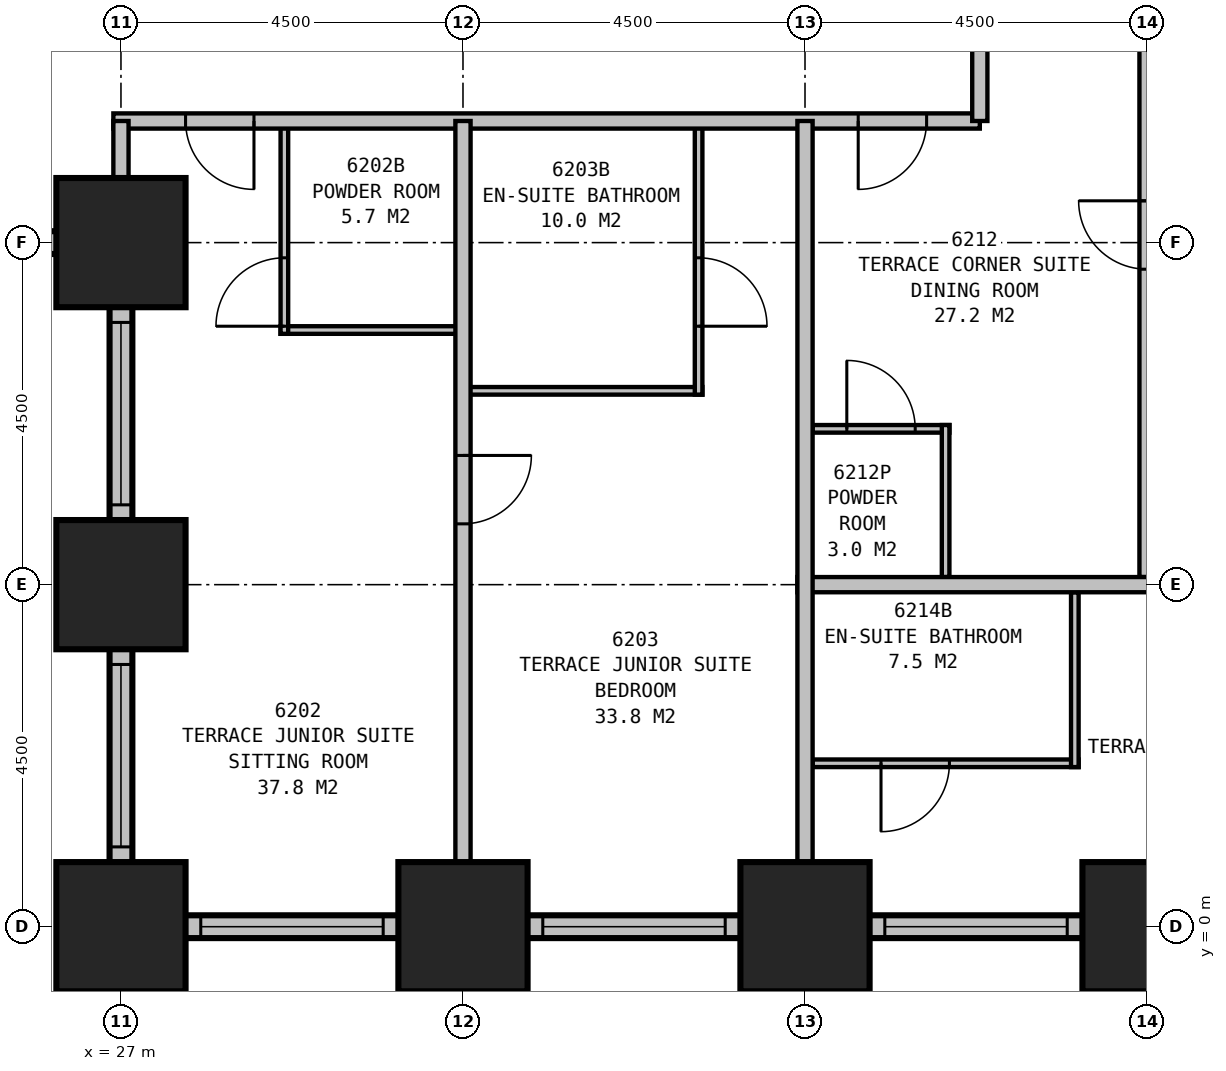
"""IFC4 building model, lengths in metres.
Left out: names, types, materials, properties, quantities, classifications, styles, units other than length and angle.
Written with IfcOpenShell. Run it as: python <this file> out.ifc"""

import sys

from ifc_helpers import new_model, si_unit, direction, frame, frame_2d, origin, origin_2d, place, context, subcontext, project, spatial, rectangle, extrude, element, fill, save


model = new_model("IFC4")
c1 = context("Model", 3, precision=1e-05, world=origin(), true_north=direction((0.0, 1.0)))
c2 = subcontext(c1, "Body", "Model", "MODEL_VIEW")
j1 = project(units=[si_unit("LENGTHUNIT", "METRE"), si_unit("PLANEANGLEUNIT", "RADIAN")], contexts=[c1])
p1 = place(None, origin())
s1 = spatial("IfcSite", under=j1, at=p1, CompositionType="ELEMENT")
p2 = place(p1, origin())
s2 = spatial("IfcBuilding", under=s1, at=p2, CompositionType="ELEMENT")
p3 = place(p2, frame((0.0, 0.0, 240.8)))
s3 = spatial("IfcBuildingStorey", under=s2, at=p3, CompositionType="ELEMENT", Elevation=240.8)
for number, where, z_axis, x_axis in (
    (1, (27.0, 9.0, 0.0), (0.0, 0.0, 1.0), (1.0, 0.0, 0.0)),
    (2, (27.0, 4.5, 0.0), (0.0, 0.0, 1.0), (1.0, 0.0, 0.0)),
    (3, (27.0, 0.0, 0.0), (0.0, 0.0, 1.0), (1.0, 0.0, 0.0)),
    (4, (31.5, 0.0, 0.0), (0.0, 0.0, 1.0), (1.0, 0.0, 0.0)),
    (5, (36.0, 0.0, 0.0), (0.0, 0.0, 1.0), (1.0, 0.0, 0.0)),
    (6, (40.5, 0.0, 0.0), (0.0, 0.0, 1.0), (1.0, 0.0, 0.0)),
):
    element("IfcColumn", number, at=place(p3, frame(where, z_axis=z_axis, x_axis=x_axis)), inside=s3, PredefinedType="COLUMN", context=c2, shape_type="SweptSolid", body=[
        extrude(rectangle(XDim=1.7, YDim=1.7, at=origin_2d()), origin(), (0.0, 0.0, 1.0), 3.9),
    ])
p4 = place(p3, frame((9.85, 9.0, 0.0), z_axis=(0.0, 0.0, 1.0), x_axis=(1.0, 0.0, 0.0)))
e7 = element("IfcWall", 7, at=p4, inside=s3, PredefinedType="STANDARD", context=c2, shape_type="SweptSolid", body=[
    extrude(rectangle(XDim=17.3, YDim=0.3, at=frame_2d((8.65, 0.0))), origin(), (0.0, 0.0, 1.0), 2.45),
])
p5 = place(p4, frame((1.15, 0.0, 0.5)))
e8 = element("IfcOpeningElement", 8, at=p5, cuts=e7, PredefinedType="OPENING", context=c2, shape_type="SweptSolid", body=[
    extrude(rectangle(XDim=1.5, YDim=1.75, at=frame_2d((0.75, 0.875))), frame((0.0, 0.16, 0.0), z_axis=(0.0, -1.0, 0.0), x_axis=(1.0, 0.0, 0.0)), (0.0, 0.0, 1.0), 0.32),
])
p6 = place(p4, frame((4.7, 0.0, 0.5)))
e9 = element("IfcOpeningElement", 9, at=p6, cuts=e7, PredefinedType="OPENING", context=c2, shape_type="SweptSolid", body=[
    extrude(rectangle(XDim=2.4, YDim=1.75, at=frame_2d((1.2, 0.875))), frame((0.0, 0.16, 0.0), z_axis=(0.0, -1.0, 0.0), x_axis=(1.0, 0.0, 0.0)), (0.0, 0.0, 1.0), 0.32),
])
p7 = place(p4, frame((9.2, 0.0, 0.5)))
e10 = element("IfcOpeningElement", 10, at=p7, cuts=e7, PredefinedType="OPENING", context=c2, shape_type="SweptSolid", body=[
    extrude(rectangle(XDim=2.4, YDim=1.75, at=frame_2d((1.2, 0.875))), frame((0.0, 0.16, 0.0), z_axis=(0.0, -1.0, 0.0), x_axis=(1.0, 0.0, 0.0)), (0.0, 0.0, 1.0), 0.32),
])
p8 = place(p4, frame((13.7, 0.0, 0.5)))
e11 = element("IfcOpeningElement", 11, at=p8, cuts=e7, PredefinedType="OPENING", context=c2, shape_type="SweptSolid", body=[
    extrude(rectangle(XDim=2.4, YDim=1.75, at=frame_2d((1.2, 0.875))), frame((0.0, 0.16, 0.0), z_axis=(0.0, -1.0, 0.0), x_axis=(1.0, 0.0, 0.0)), (0.0, 0.0, 1.0), 0.32),
])
p9 = place(p3, frame((27.0, 9.15, 0.0), z_axis=(0.0, 0.0, 1.0), x_axis=(0.0, -1.0, 0.0)))
e12 = element("IfcWall", 12, at=p9, inside=s3, PredefinedType="STANDARD", context=c2, shape_type="SweptSolid", body=[
    extrude(rectangle(XDim=9.3, YDim=0.3, at=frame_2d((4.65, 0.0))), origin(), (0.0, 0.0, 1.0), 2.45),
])
p10 = place(p9, frame((1.2, 0.0, 0.5)))
e13 = element("IfcOpeningElement", 13, at=p10, cuts=e12, PredefinedType="OPENING", context=c2, shape_type="SweptSolid", body=[
    extrude(rectangle(XDim=2.4, YDim=1.75, at=frame_2d((1.2, 0.875))), frame((0.0, 0.16, 0.0), z_axis=(0.0, -1.0, 0.0), x_axis=(1.0, 0.0, 0.0)), (0.0, 0.0, 1.0), 0.32),
])
p11 = place(p9, frame((5.7, 0.0, 0.5)))
e14 = element("IfcOpeningElement", 14, at=p11, cuts=e12, PredefinedType="OPENING", context=c2, shape_type="SweptSolid", body=[
    extrude(rectangle(XDim=2.4, YDim=1.75, at=frame_2d((1.2, 0.875))), frame((0.0, 0.16, 0.0), z_axis=(0.0, -1.0, 0.0), x_axis=(1.0, 0.0, 0.0)), (0.0, 0.0, 1.0), 0.32),
])
p12 = place(p3, frame((26.85, 0.0, 0.0), z_axis=(0.0, 0.0, 1.0), x_axis=(1.0, 0.0, 0.0)))
e15 = element("IfcWall", 15, at=p12, inside=s3, PredefinedType="STANDARD", context=c2, shape_type="SweptSolid", body=[
    extrude(rectangle(XDim=18.3, YDim=0.3, at=frame_2d((9.15, 0.0))), origin(), (0.0, 0.0, 1.0), 2.45),
])
p13 = place(p12, frame((1.2, 0.0, 0.5)))
e16 = element("IfcOpeningElement", 16, at=p13, cuts=e15, PredefinedType="OPENING", context=c2, shape_type="SweptSolid", body=[
    extrude(rectangle(XDim=2.4, YDim=1.75, at=frame_2d((1.2, 0.875))), frame((0.0, 0.16, 0.0), z_axis=(0.0, -1.0, 0.0), x_axis=(1.0, 0.0, 0.0)), (0.0, 0.0, 1.0), 0.32),
])
p14 = place(p12, frame((5.7, 0.0, 0.5)))
e17 = element("IfcOpeningElement", 17, at=p14, cuts=e15, PredefinedType="OPENING", context=c2, shape_type="SweptSolid", body=[
    extrude(rectangle(XDim=2.4, YDim=1.75, at=frame_2d((1.2, 0.875))), frame((0.0, 0.16, 0.0), z_axis=(0.0, -1.0, 0.0), x_axis=(1.0, 0.0, 0.0)), (0.0, 0.0, 1.0), 0.32),
])
p15 = place(p12, frame((10.2, 0.0, 0.5)))
e18 = element("IfcOpeningElement", 18, at=p15, cuts=e15, PredefinedType="OPENING", context=c2, shape_type="SweptSolid", body=[
    extrude(rectangle(XDim=2.4, YDim=1.75, at=frame_2d((1.2, 0.875))), frame((0.0, 0.16, 0.0), z_axis=(0.0, -1.0, 0.0), x_axis=(1.0, 0.0, 0.0)), (0.0, 0.0, 1.0), 0.32),
])
p16 = place(p12, frame((14.7, 0.0, 0.5)))
e19 = element("IfcOpeningElement", 19, at=p16, cuts=e15, PredefinedType="OPENING", context=c2, shape_type="SweptSolid", body=[
    extrude(rectangle(XDim=2.4, YDim=1.75, at=frame_2d((1.2, 0.875))), frame((0.0, 0.16, 0.0), z_axis=(0.0, -1.0, 0.0), x_axis=(1.0, 0.0, 0.0)), (0.0, 0.0, 1.0), 0.32),
])
p17 = place(p3, frame((26.9, 10.6, 0.0), z_axis=(0.0, 0.0, 1.0), x_axis=(1.0, 0.0, 0.0)))
e20 = element("IfcWall", 20, at=p17, inside=s3, PredefinedType="PARTITIONING", context=c2, shape_type="SweptSolid", body=[
    extrude(rectangle(XDim=11.4, YDim=0.2, at=frame_2d((5.7, 0.0))), origin(), (0.0, 0.0, 1.0), 3.65),
])
p18 = place(p17, frame((1.85, 0.0, 0.0), z_axis=(0.0, 0.0, 1.0), x_axis=(-1.0, 0.0, 0.0)))
e21 = element("IfcOpeningElement", 21, at=p18, cuts=e20, PredefinedType="OPENING", context=c2, shape_type="SweptSolid", body=[
    extrude(rectangle(XDim=0.9, YDim=2.1, at=frame_2d((0.45, 1.05))), frame((0.0, 0.11, 0.0), z_axis=(0.0, -1.0, 0.0), x_axis=(1.0, 0.0, 0.0)), (0.0, 0.0, 1.0), 0.22),
])
p19 = place(p17, frame((10.7, 0.0, 0.0), z_axis=(0.0, 0.0, 1.0), x_axis=(-1.0, 0.0, 0.0)))
e22 = element("IfcOpeningElement", 22, at=p19, cuts=e20, PredefinedType="OPENING", context=c2, shape_type="SweptSolid", body=[
    extrude(rectangle(XDim=0.9, YDim=2.1, at=frame_2d((0.45, 1.05))), frame((0.0, 0.11, 0.0), z_axis=(0.0, -1.0, 0.0), x_axis=(1.0, 0.0, 0.0)), (0.0, 0.0, 1.0), 0.22),
])
p20 = place(p3, frame((38.3, 10.6, 0.0), z_axis=(0.0, 0.0, 1.0), x_axis=(0.0, 1.0, 0.0)))
e23 = element("IfcWall", 23, at=p20, inside=s3, PredefinedType="PARTITIONING", context=c2, shape_type="SweptSolid", body=[
    extrude(rectangle(XDim=18.7, YDim=0.2, at=frame_2d((9.35, 0.0))), origin(), (0.0, 0.0, 1.0), 3.65),
])
p21 = place(p20, frame((6.55, 0.0, 0.0), z_axis=(0.0, 0.0, 1.0), x_axis=(-1.0, 0.0, 0.0)))
e24 = element("IfcOpeningElement", 24, at=p21, cuts=e23, PredefinedType="OPENING", context=c2, shape_type="SweptSolid", body=[
    extrude(rectangle(XDim=0.9, YDim=2.1, at=frame_2d((0.45, 1.05))), frame((0.0, 0.11, 0.0), z_axis=(0.0, -1.0, 0.0), x_axis=(1.0, 0.0, 0.0)), (0.0, 0.0, 1.0), 0.22),
])
p22 = place(p20, frame((16.1, 0.0, 0.0), z_axis=(0.0, 0.0, 1.0), x_axis=(-1.0, 0.0, 0.0)))
e25 = element("IfcOpeningElement", 25, at=p22, cuts=e23, PredefinedType="OPENING", context=c2, shape_type="SweptSolid", body=[
    extrude(rectangle(XDim=1.0, YDim=2.1, at=frame_2d((0.5, 1.05))), frame((0.0, 0.11, 0.0), z_axis=(0.0, -1.0, 0.0), x_axis=(1.0, 0.0, 0.0)), (0.0, 0.0, 1.0), 0.22),
])
p23 = place(p3, frame((27.0, 10.6, 0.0), z_axis=(0.0, 0.0, 1.0), x_axis=(0.0, -1.0, 0.0)))
e26 = element("IfcWall", 26, at=p23, inside=s3, PredefinedType="PARTITIONING", context=c2, shape_type="SweptSolid", body=[
    extrude(rectangle(XDim=1.6, YDim=0.2, at=frame_2d((0.8, 0.0))), origin(), (0.0, 0.0, 1.0), 2.6),
])
p24 = place(p3, frame((31.5, 10.6, 0.0), z_axis=(0.0, 0.0, 1.0), x_axis=(0.0, -1.0, 0.0)))
e27 = element("IfcWall", 27, at=p24, inside=s3, PredefinedType="PARTITIONING", context=c2, shape_type="SweptSolid", body=[
    extrude(rectangle(XDim=10.6, YDim=0.2, at=frame_2d((5.3, 0.0))), origin(), (0.0, 0.0, 1.0), 2.6),
])
p25 = place(p24, frame((4.4, 0.0, 0.0)))
e28 = element("IfcOpeningElement", 28, at=p25, cuts=e27, PredefinedType="OPENING", context=c2, shape_type="SweptSolid", body=[
    extrude(rectangle(XDim=0.9, YDim=2.1, at=frame_2d((0.45, 1.05))), frame((0.0, 0.11, 0.0), z_axis=(0.0, -1.0, 0.0), x_axis=(1.0, 0.0, 0.0)), (0.0, 0.0, 1.0), 0.22),
])
p26 = place(p3, frame((29.1, 7.85, 0.0), z_axis=(0.0, 0.0, 1.0), x_axis=(1.0, 0.0, 0.0)))
e29 = element("IfcWall", 29, at=p26, inside=s3, PredefinedType="PLUMBINGWALL", context=c2, shape_type="SweptSolid", body=[
    extrude(rectangle(XDim=2.4, YDim=0.1, at=frame_2d((1.2, 0.0))), origin(), (0.0, 0.0, 1.0), 3.65),
])
p27 = place(p3, frame((29.15, 10.6, 0.0), z_axis=(0.0, 0.0, 1.0), x_axis=(0.0, -1.0, 0.0)))
e30 = element("IfcWall", 30, at=p27, inside=s3, PredefinedType="PLUMBINGWALL", context=c2, shape_type="SweptSolid", body=[
    extrude(rectangle(XDim=2.8, YDim=0.1, at=frame_2d((1.4, 0.0))), origin(), (0.0, 0.0, 1.0), 3.65),
])
p28 = place(p27, frame((2.7, 0.0, 0.0), z_axis=(0.0, 0.0, 1.0), x_axis=(-1.0, 0.0, 0.0)))
e31 = element("IfcOpeningElement", 31, at=p28, cuts=e30, PredefinedType="OPENING", context=c2, shape_type="SweptSolid", body=[
    extrude(rectangle(XDim=0.9, YDim=2.1, at=frame_2d((0.45, 1.05))), frame((0.0, 0.06, 0.0), z_axis=(0.0, -1.0, 0.0), x_axis=(1.0, 0.0, 0.0)), (0.0, 0.0, 1.0), 0.12),
])
p29 = place(p3, frame((31.5, 7.05, 0.0), z_axis=(0.0, 0.0, 1.0), x_axis=(1.0, 0.0, 0.0)))
e32 = element("IfcWall", 32, at=p29, inside=s3, PredefinedType="PLUMBINGWALL", context=c2, shape_type="SweptSolid", body=[
    extrude(rectangle(XDim=3.15, YDim=0.1, at=frame_2d((1.575, 0.0))), origin(), (0.0, 0.0, 1.0), 3.65),
])
p30 = place(p3, frame((34.6, 10.6, 0.0), z_axis=(0.0, 0.0, 1.0), x_axis=(0.0, -1.0, 0.0)))
e33 = element("IfcWall", 33, at=p30, inside=s3, PredefinedType="PLUMBINGWALL", context=c2, shape_type="SweptSolid", body=[
    extrude(rectangle(XDim=3.6, YDim=0.1, at=frame_2d((1.8, 0.0))), origin(), (0.0, 0.0, 1.0), 3.65),
])
p31 = place(p30, frame((1.8, 0.0, 0.0)))
e34 = element("IfcOpeningElement", 34, at=p31, cuts=e33, PredefinedType="OPENING", context=c2, shape_type="SweptSolid", body=[
    extrude(rectangle(XDim=0.9, YDim=2.1, at=frame_2d((0.45, 1.05))), frame((0.0, 0.06, 0.0), z_axis=(0.0, -1.0, 0.0), x_axis=(1.0, 0.0, 0.0)), (0.0, 0.0, 1.0), 0.12),
])
p32 = place(p3, frame((36.0, 10.6, 0.0), z_axis=(0.0, 0.0, 1.0), x_axis=(0.0, -1.0, 0.0)))
e35 = element("IfcWall", 35, at=p32, inside=s3, PredefinedType="PARTITIONING", context=c2, shape_type="SweptSolid", body=[
    extrude(rectangle(XDim=10.6, YDim=0.2, at=frame_2d((5.3, 0.0))), origin(), (0.0, 0.0, 1.0), 2.6),
])
p33 = place(p3, frame((35.9, 4.5, 0.0), z_axis=(0.0, 0.0, 1.0), x_axis=(1.0, 0.0, 0.0)))
e36 = element("IfcWall", 36, at=p33, inside=s3, PredefinedType="PARTITIONING", context=c2, shape_type="SweptSolid", body=[
    extrude(rectangle(XDim=9.1, YDim=0.2, at=frame_2d((4.55, 0.0))), origin(), (0.0, 0.0, 1.0), 3.65),
])
p34 = place(p33, frame((7.1, 0.0, 0.0)))
e37 = element("IfcOpeningElement", 37, at=p34, cuts=e36, PredefinedType="OPENING", context=c2, shape_type="SweptSolid", body=[
    extrude(rectangle(XDim=0.9, YDim=2.1, at=frame_2d((0.45, 1.05))), frame((0.0, 0.11, 0.0), z_axis=(0.0, -1.0, 0.0), x_axis=(1.0, 0.0, 0.0)), (0.0, 0.0, 1.0), 0.22),
])
p35 = place(p3, frame((40.5, 4.6, 0.0), z_axis=(0.0, 0.0, 1.0), x_axis=(0.0, 1.0, 0.0)))
e38 = element("IfcWall", 38, at=p35, inside=s3, PredefinedType="PARTITIONING", context=c2, shape_type="SweptSolid", body=[
    extrude(rectangle(XDim=8.8, YDim=0.2, at=frame_2d((4.4, 0.0))), origin(), (0.0, 0.0, 1.0), 2.6),
])
p36 = place(p35, frame((4.05, 0.0, 0.0)))
e39 = element("IfcOpeningElement", 39, at=p36, cuts=e38, PredefinedType="OPENING", context=c2, shape_type="SweptSolid", body=[
    extrude(rectangle(XDim=0.9, YDim=2.1, at=frame_2d((0.45, 1.05))), frame((0.0, 0.11, 0.0), z_axis=(0.0, -1.0, 0.0), x_axis=(1.0, 0.0, 0.0)), (0.0, 0.0, 1.0), 0.22),
])
p37 = place(p3, frame((37.85, 4.6, 0.0), z_axis=(0.0, 0.0, 1.0), x_axis=(0.0, 1.0, 0.0)))
e40 = element("IfcWall", 40, at=p37, inside=s3, PredefinedType="PLUMBINGWALL", context=c2, shape_type="SweptSolid", body=[
    extrude(rectangle(XDim=2.0, YDim=0.1, at=frame_2d((1.0, 0.0))), origin(), (0.0, 0.0, 1.0), 3.65),
])
p38 = place(p3, frame((36.1, 6.55, 0.0), z_axis=(0.0, 0.0, 1.0), x_axis=(1.0, 0.0, 0.0)))
e41 = element("IfcWall", 41, at=p38, inside=s3, PredefinedType="PLUMBINGWALL", context=c2, shape_type="SweptSolid", body=[
    extrude(rectangle(XDim=1.8, YDim=0.1, at=frame_2d((0.9, 0.0))), origin(), (0.0, 0.0, 1.0), 3.65),
])
p39 = place(p38, frame((0.45, 0.0, 0.0)))
e42 = element("IfcOpeningElement", 42, at=p39, cuts=e41, PredefinedType="OPENING", context=c2, shape_type="SweptSolid", body=[
    extrude(rectangle(XDim=0.9, YDim=2.1, at=frame_2d((0.45, 1.05))), frame((0.0, 0.06, 0.0), z_axis=(0.0, -1.0, 0.0), x_axis=(1.0, 0.0, 0.0)), (0.0, 0.0, 1.0), 0.12),
])
p40 = place(p3, frame((39.55, 4.4, 0.0), z_axis=(0.0, 0.0, 1.0), x_axis=(0.0, -1.0, 0.0)))
e43 = element("IfcWall", 43, at=p40, inside=s3, PredefinedType="PLUMBINGWALL", context=c2, shape_type="SweptSolid", body=[
    extrude(rectangle(XDim=2.3, YDim=0.1, at=frame_2d((1.15, 0.0))), origin(), (0.0, 0.0, 1.0), 3.65),
])
p41 = place(p3, frame((36.1, 2.15, 0.0), z_axis=(0.0, 0.0, 1.0), x_axis=(1.0, 0.0, 0.0)))
e44 = element("IfcWall", 44, at=p41, inside=s3, PredefinedType="PLUMBINGWALL", context=c2, shape_type="SweptSolid", body=[
    extrude(rectangle(XDim=3.5, YDim=0.1, at=frame_2d((1.75, 0.0))), origin(), (0.0, 0.0, 1.0), 3.65),
])
p42 = place(p41, frame((1.8, 0.0, 0.0), z_axis=(0.0, 0.0, 1.0), x_axis=(-1.0, 0.0, 0.0)))
e45 = element("IfcOpeningElement", 45, at=p42, cuts=e44, PredefinedType="OPENING", context=c2, shape_type="SweptSolid", body=[
    extrude(rectangle(XDim=0.9, YDim=2.1, at=frame_2d((0.45, 1.05))), frame((0.0, 0.06, 0.0), z_axis=(0.0, -1.0, 0.0), x_axis=(1.0, 0.0, 0.0)), (0.0, 0.0, 1.0), 0.12),
])
p43 = place(p10, origin())
e46 = element("IfcWindow", 46, at=p43, inside=s3, PartitioningType="SINGLE_PANEL", PredefinedType="WINDOW", context=c2, shape_type="SweptSolid", body=[
    extrude(rectangle(XDim=2.4, YDim=1.75, at=frame_2d((1.2, 0.875))), frame((0.0, 0.03, 0.0), z_axis=(0.0, -1.0, 0.0), x_axis=(1.0, 0.0, 0.0)), (0.0, 0.0, 1.0), 0.06),
])
fill(e13, e46)
p44 = place(p11, origin())
e47 = element("IfcWindow", 47, at=p44, inside=s3, PartitioningType="SINGLE_PANEL", PredefinedType="WINDOW", context=c2, shape_type="SweptSolid", body=[
    extrude(rectangle(XDim=2.4, YDim=1.75, at=frame_2d((1.2, 0.875))), frame((0.0, 0.03, 0.0), z_axis=(0.0, -1.0, 0.0), x_axis=(1.0, 0.0, 0.0)), (0.0, 0.0, 1.0), 0.06),
])
fill(e14, e47)
p45 = place(p13, origin())
e48 = element("IfcWindow", 48, at=p45, inside=s3, PartitioningType="SINGLE_PANEL", PredefinedType="WINDOW", context=c2, shape_type="SweptSolid", body=[
    extrude(rectangle(XDim=2.4, YDim=1.75, at=frame_2d((1.2, 0.875))), frame((0.0, 0.03, 0.0), z_axis=(0.0, -1.0, 0.0), x_axis=(1.0, 0.0, 0.0)), (0.0, 0.0, 1.0), 0.06),
])
fill(e16, e48)
p46 = place(p14, origin())
e49 = element("IfcWindow", 49, at=p46, inside=s3, PartitioningType="SINGLE_PANEL", PredefinedType="WINDOW", context=c2, shape_type="SweptSolid", body=[
    extrude(rectangle(XDim=2.4, YDim=1.75, at=frame_2d((1.2, 0.875))), frame((0.0, 0.03, 0.0), z_axis=(0.0, -1.0, 0.0), x_axis=(1.0, 0.0, 0.0)), (0.0, 0.0, 1.0), 0.06),
])
fill(e17, e49)
p47 = place(p15, origin())
e50 = element("IfcWindow", 50, at=p47, inside=s3, PartitioningType="SINGLE_PANEL", PredefinedType="WINDOW", context=c2, shape_type="SweptSolid", body=[
    extrude(rectangle(XDim=2.4, YDim=1.75, at=frame_2d((1.2, 0.875))), frame((0.0, 0.03, 0.0), z_axis=(0.0, -1.0, 0.0), x_axis=(1.0, 0.0, 0.0)), (0.0, 0.0, 1.0), 0.06),
])
fill(e18, e50)
p48 = place(p18, origin())
e51 = element("IfcDoor", 51, at=p48, inside=s3, OperationType="SINGLE_SWING_LEFT", PredefinedType="DOOR", context=c2, shape_type="SweptSolid", body=[
    extrude(rectangle(XDim=0.9, YDim=2.1, at=frame_2d((0.45, 1.05))), frame((0.0, 0.025, 0.0), z_axis=(0.0, -1.0, 0.0), x_axis=(1.0, 0.0, 0.0)), (0.0, 0.0, 1.0), 0.05),
])
fill(e21, e51)
p49 = place(p19, origin())
e52 = element("IfcDoor", 52, at=p49, inside=s3, OperationType="SINGLE_SWING_RIGHT", PredefinedType="DOOR", context=c2, shape_type="SweptSolid", body=[
    extrude(rectangle(XDim=0.9, YDim=2.1, at=frame_2d((0.45, 1.05))), frame((0.0, 0.025, 0.0), z_axis=(0.0, -1.0, 0.0), x_axis=(1.0, 0.0, 0.0)), (0.0, 0.0, 1.0), 0.05),
])
fill(e22, e52)
p50 = place(p25, origin())
e53 = element("IfcDoor", 53, at=p50, inside=s3, OperationType="SINGLE_SWING_LEFT", PredefinedType="DOOR", context=c2, shape_type="SweptSolid", body=[
    extrude(rectangle(XDim=0.9, YDim=2.1, at=frame_2d((0.45, 1.05))), frame((0.0, 0.025, 0.0), z_axis=(0.0, -1.0, 0.0), x_axis=(1.0, 0.0, 0.0)), (0.0, 0.0, 1.0), 0.05),
])
fill(e28, e53)
p51 = place(p28, origin())
e54 = element("IfcDoor", 54, at=p51, inside=s3, OperationType="SINGLE_SWING_LEFT", PredefinedType="DOOR", context=c2, shape_type="SweptSolid", body=[
    extrude(rectangle(XDim=0.9, YDim=2.1, at=frame_2d((0.45, 1.05))), frame((0.0, 0.025, 0.0), z_axis=(0.0, -1.0, 0.0), x_axis=(1.0, 0.0, 0.0)), (0.0, 0.0, 1.0), 0.05),
])
fill(e31, e54)
p52 = place(p31, origin())
e55 = element("IfcDoor", 55, at=p52, inside=s3, OperationType="SINGLE_SWING_RIGHT", PredefinedType="DOOR", context=c2, shape_type="SweptSolid", body=[
    extrude(rectangle(XDim=0.9, YDim=2.1, at=frame_2d((0.45, 1.05))), frame((0.0, 0.025, 0.0), z_axis=(0.0, -1.0, 0.0), x_axis=(1.0, 0.0, 0.0)), (0.0, 0.0, 1.0), 0.05),
])
fill(e34, e55)
p53 = place(p36, origin())
e56 = element("IfcDoor", 56, at=p53, inside=s3, OperationType="SINGLE_SWING_RIGHT", PredefinedType="DOOR", context=c2, shape_type="SweptSolid", body=[
    extrude(rectangle(XDim=0.9, YDim=2.1, at=frame_2d((0.45, 1.05))), frame((0.0, 0.025, 0.0), z_axis=(0.0, -1.0, 0.0), x_axis=(1.0, 0.0, 0.0)), (0.0, 0.0, 1.0), 0.05),
])
fill(e39, e56)
p54 = place(p39, origin())
e57 = element("IfcDoor", 57, at=p54, inside=s3, OperationType="SINGLE_SWING_LEFT", PredefinedType="DOOR", context=c2, shape_type="SweptSolid", body=[
    extrude(rectangle(XDim=0.9, YDim=2.1, at=frame_2d((0.45, 1.05))), frame((0.0, 0.025, 0.0), z_axis=(0.0, -1.0, 0.0), x_axis=(1.0, 0.0, 0.0)), (0.0, 0.0, 1.0), 0.05),
])
fill(e42, e57)
p55 = place(p42, origin())
e58 = element("IfcDoor", 58, at=p55, inside=s3, OperationType="SINGLE_SWING_RIGHT", PredefinedType="DOOR", context=c2, shape_type="SweptSolid", body=[
    extrude(rectangle(XDim=0.9, YDim=2.1, at=frame_2d((0.45, 1.05))), frame((0.0, 0.025, 0.0), z_axis=(0.0, -1.0, 0.0), x_axis=(1.0, 0.0, 0.0)), (0.0, 0.0, 1.0), 0.05),
])
fill(e45, e58)
save(model, sys.argv[1])
